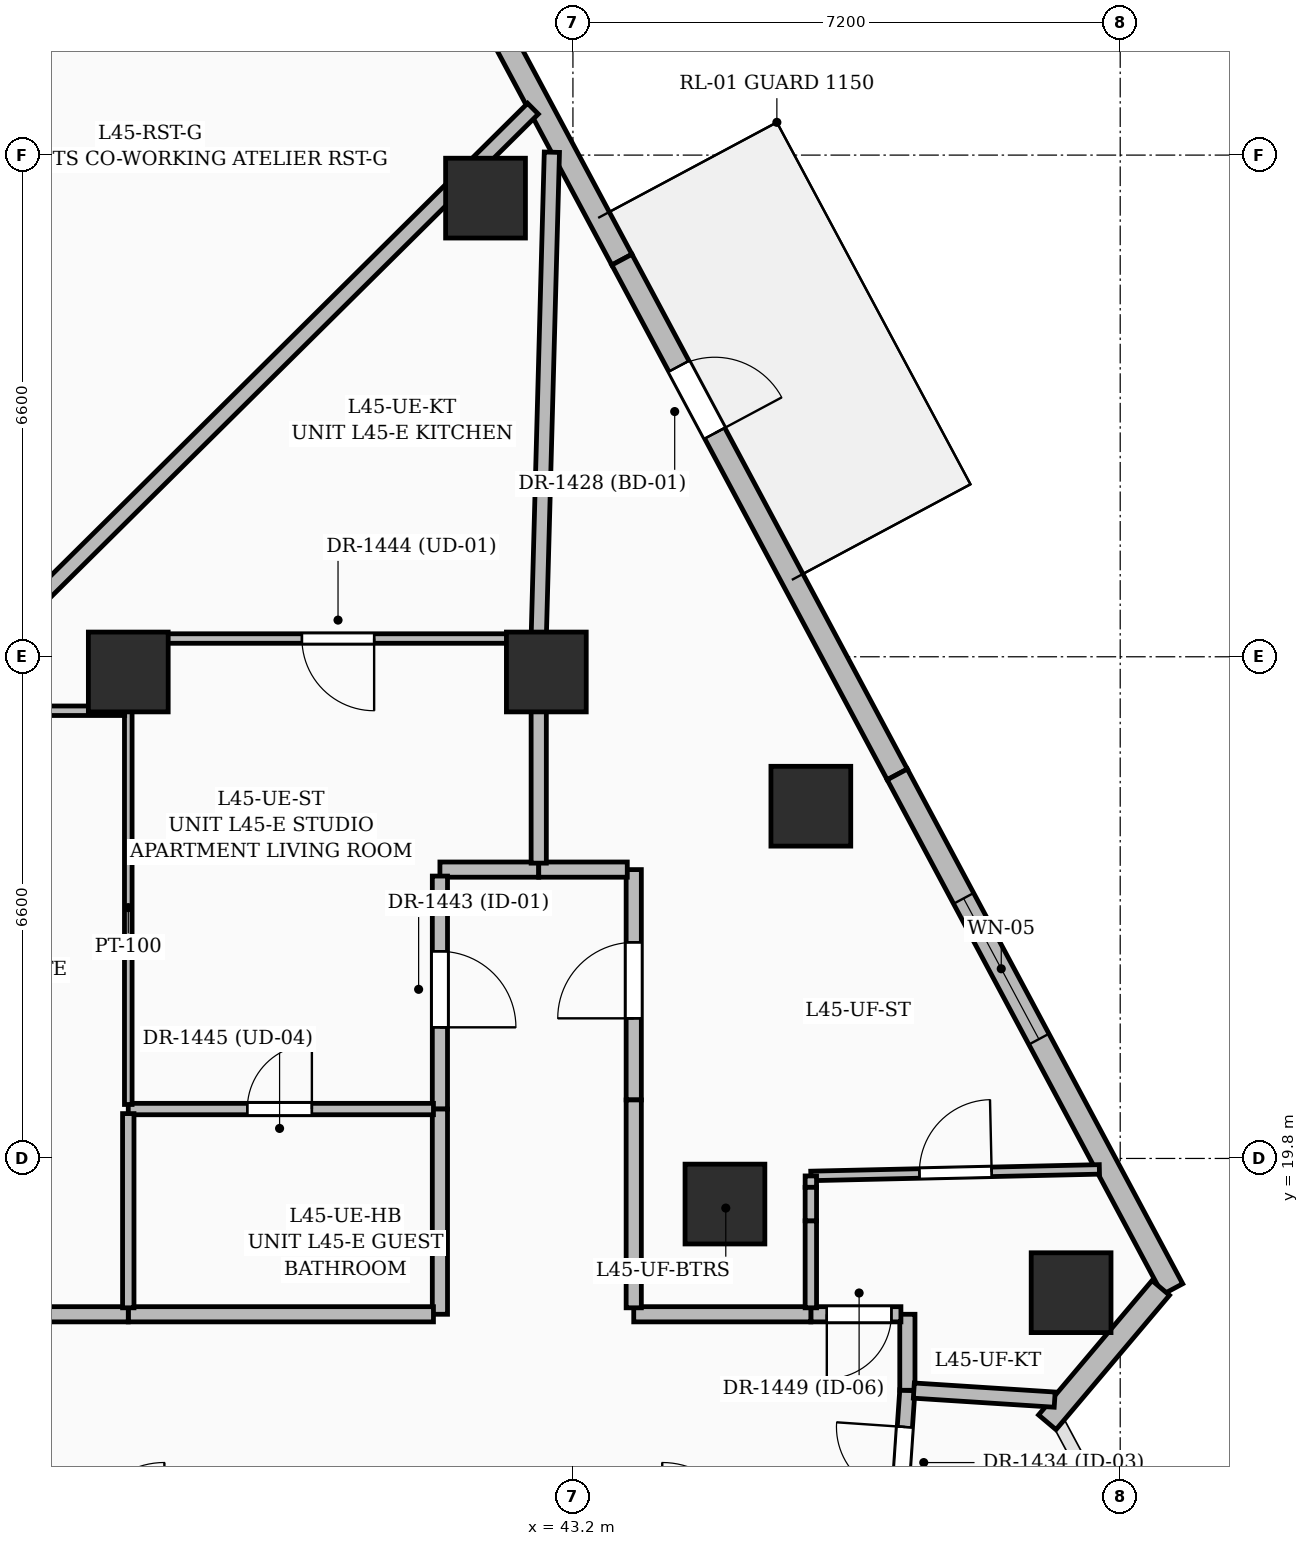
"""IFC4 building model, lengths in metres.
Left out: names, types, materials, properties, quantities, classifications, styles, units other than length and angle.
Written with IfcOpenShell. Run it as: python <this file> out.ifc"""

import sys

from ifc_helpers import new_model, si_unit, direction, frame, frame_2d, origin, origin_2d, place, context, subcontext, project, spatial, rectangle, extrude, element, fill, save


model = new_model("IFC4")
c1 = context("Model", 3, precision=1e-05, world=origin(), true_north=direction((0.0, 1.0)))
c2 = subcontext(c1, "Body", "Model", "MODEL_VIEW")
j1 = project(units=[si_unit("LENGTHUNIT", "METRE"), si_unit("PLANEANGLEUNIT", "RADIAN")], contexts=[c1])
p1 = place(None, origin())
s1 = spatial("IfcSite", under=j1, at=p1, CompositionType="ELEMENT")
p2 = place(p1, origin())
s2 = spatial("IfcBuilding", under=s1, at=p2, CompositionType="ELEMENT")
p3 = place(p2, frame((0.0, 0.0, 175.2)))
s3 = spatial("IfcBuildingStorey", under=s2, at=p3, CompositionType="ELEMENT", Elevation=175.2)
for number, where, z_axis, x_axis in (
    (1, (45.2, 19.2, 0.0), (0.0, 0.0, 1.0), (1.0, 0.0, 0.0)),
    (2, (42.85, 26.2, 0.0), (0.0, 0.0, 1.0), (1.0, 0.0, 0.0)),
    (3, (37.35, 26.2, 0.0), (0.0, 0.0, 1.0), (1.0, 0.0, 0.0)),
    (4, (49.754, 18.034, 0.0), (0.0, 0.0, 1.0), (1.0, 0.0, 0.0)),
    (5, (46.33, 24.434, 0.0), (0.0, 0.0, 1.0), (1.0, 0.0, 0.0)),
    (6, (42.05, 32.434, 0.0), (0.0, 0.0, 1.0), (1.0, 0.0, 0.0)),
):
    element("IfcColumn", number, at=place(p3, frame(where, z_axis=z_axis, x_axis=x_axis)), inside=s3, PredefinedType="COLUMN", context=c2, shape_type="SweptSolid", body=[
        extrude(rectangle(XDim=1.05, YDim=1.05, at=origin_2d()), origin(), (0.0, 0.0, 1.0), 3.6),
    ])
p4 = place(p3, frame((33.098, 33.58, 0.0), z_axis=(0.0, 0.0, 1.0), x_axis=(0.542037422538, 0.840354349408, 0.0)))
e7 = element("IfcWall", 7, at=p4, inside=s3, PredefinedType="SOLIDWALL", context=c2, shape_type="SweptSolid", body=[
    extrude(rectangle(XDim=5.782, YDim=0.3, at=frame_2d((2.891, 0.0))), origin(), (0.0, 0.0, 1.0), 3.35),
])
p5 = place(p4, frame((1.2, 0.0, 0.6)))
e8 = element("IfcOpeningElement", 8, at=p5, cuts=e7, PredefinedType="OPENING", context=c2, shape_type="SweptSolid", body=[
    extrude(rectangle(XDim=2.4, YDim=2.1, at=frame_2d((1.2, 1.05))), frame((0.0, 0.16, 0.0), z_axis=(0.0, -1.0, 0.0), x_axis=(1.0, 0.0, 0.0)), (0.0, 0.0, 1.0), 0.32),
])
p6 = place(p3, frame((40.495, 37.885, 0.0), z_axis=(0.0, 0.0, 1.0), x_axis=(0.471731834897, -0.88174206883, 0.0)))
e9 = element("IfcWall", 9, at=p6, inside=s3, PredefinedType="SOLIDWALL", context=c2, shape_type="SweptSolid", body=[
    extrude(rectangle(XDim=7.1, YDim=0.3, at=frame_2d((3.55, 0.0))), origin(), (0.0, 0.0, 1.0), 3.35),
])
p7 = place(p6, frame((2.22, 0.0, 0.8)))
e10 = element("IfcOpeningElement", 10, at=p7, cuts=e9, PredefinedType="OPENING", context=c2, shape_type="SweptSolid", body=[
    extrude(rectangle(XDim=1.2, YDim=1.8, at=frame_2d((0.6, 0.9))), frame((0.0, 0.16, 0.0), z_axis=(0.0, -1.0, 0.0), x_axis=(1.0, 0.0, 0.0)), (0.0, 0.0, 1.0), 0.32),
])
p8 = place(p3, frame((43.844, 31.625, 0.0), z_axis=(0.0, 0.0, 1.0), x_axis=(0.471736169991, -0.881739749542, 0.0)))
e11 = element("IfcWall", 11, at=p8, inside=s3, PredefinedType="SOLIDWALL", context=c2, shape_type="SweptSolid", body=[
    extrude(rectangle(XDim=7.68, YDim=0.3, at=frame_2d((3.84, 0.0))), origin(), (0.0, 0.0, 1.0), 3.35),
])
p9 = place(p8, frame((1.59, 0.0, 0.0)))
e12 = element("IfcOpeningElement", 12, at=p9, cuts=e11, PredefinedType="OPENING", context=c2, shape_type="SweptSolid", body=[
    extrude(rectangle(XDim=1.0, YDim=2.2, at=frame_2d((0.5, 1.1))), frame((0.0, 0.16, 0.0), z_axis=(0.0, -1.0, 0.0), x_axis=(1.0, 0.0, 0.0)), (0.0, 0.0, 1.0), 0.32),
])
p10 = place(p3, frame((47.467, 24.853, 0.0), z_axis=(0.0, 0.0, 1.0), x_axis=(0.471736169991, -0.881739749542, 0.0)))
e13 = element("IfcWall", 13, at=p10, inside=s3, PredefinedType="SOLIDWALL", context=c2, shape_type="SweptSolid", body=[
    extrude(rectangle(XDim=7.68, YDim=0.3, at=frame_2d((3.84, 0.0))), origin(), (0.0, 0.0, 1.0), 3.35),
])
p11 = place(p10, frame((1.85, 0.0, 0.55)))
e14 = element("IfcOpeningElement", 14, at=p11, cuts=e13, PredefinedType="OPENING", context=c2, shape_type="SweptSolid", body=[
    extrude(rectangle(XDim=2.1, YDim=2.4, at=frame_2d((1.05, 1.2))), frame((0.0, 0.16, 0.0), z_axis=(0.0, -1.0, 0.0), x_axis=(1.0, 0.0, 0.0)), (0.0, 0.0, 1.0), 0.32),
])
p12 = place(p3, frame((50.934, 18.097, 0.0), z_axis=(0.0, 0.0, 1.0), x_axis=(-0.645152076947, -0.764054184996, 0.0)))
e15 = element("IfcWall", 15, at=p12, inside=s3, PredefinedType="SOLIDWALL", context=c2, shape_type="SweptSolid", body=[
    extrude(rectangle(XDim=2.314, YDim=0.3, at=frame_2d((1.157, 0.0))), origin(), (0.0, 0.0, 1.0), 2.575),
])
p13 = place(p3, frame((47.425, 14.2, 0.0), z_axis=(0.0, 0.0, 1.0), x_axis=(0.068484119878, 0.997652206595, 0.0)))
e16 = element("IfcWall", 16, at=p13, inside=s3, PredefinedType="PARTITIONING", context=c2, shape_type="SweptSolid", body=[
    extrude(rectangle(XDim=2.556, YDim=0.2, at=frame_2d((1.278, 0.0))), origin(), (0.0, 0.0, 1.0), 2.464),
])
p14 = place(p13, frame((1.172, 0.0, 0.0)))
e17 = element("IfcOpeningElement", 17, at=p14, cuts=e16, PredefinedType="OPENING", context=c2, shape_type="SweptSolid", body=[
    extrude(rectangle(XDim=0.9, YDim=2.1, at=frame_2d((0.45, 1.05))), frame((0.0, 0.11, 0.0), z_axis=(0.0, -1.0, 0.0), x_axis=(1.0, 0.0, 0.0)), (0.0, 0.0, 1.0), 0.22),
])
p15 = place(p3, frame((42.75, 23.6, 0.0), z_axis=(0.0, 0.0, 1.0), x_axis=(-1.0, 0.0, 0.0)))
e18 = element("IfcWall", 18, at=p15, inside=s3, PredefinedType="PARTITIONING", context=c2, shape_type="SweptSolid", body=[
    extrude(rectangle(XDim=1.3, YDim=0.2, at=frame_2d((0.65, 0.0))), origin(), (0.0, 0.0, 1.0), 3.35),
])
p16 = place(p3, frame((41.45, 23.515, 0.0), z_axis=(0.0, 0.0, 1.0), x_axis=(0.0, -1.0, 0.0)))
e19 = element("IfcWall", 19, at=p16, inside=s3, PredefinedType="PARTITIONING", context=c2, shape_type="SweptSolid", body=[
    extrude(rectangle(XDim=3.065, YDim=0.2, at=frame_2d((1.532, 0.0))), origin(), (0.0, 0.0, 1.0), 3.35),
])
p17 = place(p16, frame((0.99, 0.0, 0.0)))
e20 = element("IfcOpeningElement", 20, at=p17, cuts=e19, PredefinedType="OPENING", context=c2, shape_type="SweptSolid", body=[
    extrude(rectangle(XDim=1.0, YDim=2.2, at=frame_2d((0.5, 1.1))), frame((0.0, 0.11, 0.0), z_axis=(0.0, -1.0, 0.0), x_axis=(1.0, 0.0, 0.0)), (0.0, 0.0, 1.0), 0.22),
])
p18 = place(p3, frame((41.45, 20.45, 0.0), z_axis=(0.0, 0.0, 1.0), x_axis=(0.0, -1.0, 0.0)))
e21 = element("IfcWall", 21, at=p18, inside=s3, PredefinedType="PARTITIONING", context=c2, shape_type="SweptSolid", body=[
    extrude(rectangle(XDim=2.7, YDim=0.2, at=frame_2d((1.35, 0.0))), origin(), (0.0, 0.0, 1.0), 2.853),
])
p19 = place(p3, frame((41.365, 17.75, 0.0), z_axis=(0.0, 0.0, 1.0), x_axis=(-1.0, 0.0, 0.0)))
e22 = element("IfcWall", 22, at=p19, inside=s3, PredefinedType="PARTITIONING", context=c2, shape_type="SweptSolid", body=[
    extrude(rectangle(XDim=4.015, YDim=0.2, at=frame_2d((2.007, 0.0))), origin(), (0.0, 0.0, 1.0), 3.35),
])
p20 = place(p3, frame((37.35, 17.75, 0.0), z_axis=(0.0, 0.0, 1.0), x_axis=(-1.0, 0.0, 0.0)))
e23 = element("IfcWall", 23, at=p20, inside=s3, PredefinedType="PARTITIONING", context=c2, shape_type="SweptSolid", body=[
    extrude(rectangle(XDim=5.4, YDim=0.2, at=frame_2d((2.7, 0.0))), origin(), (0.0, 0.0, 1.0), 2.436),
])
p21 = place(p20, frame((2.141, 0.0, 0.0)))
e24 = element("IfcOpeningElement", 24, at=p21, cuts=e23, PredefinedType="OPENING", context=c2, shape_type="SweptSolid", body=[
    extrude(rectangle(XDim=1.0, YDim=2.2, at=frame_2d((0.5, 1.1))), frame((0.0, 0.11, 0.0), z_axis=(0.0, -1.0, 0.0), x_axis=(1.0, 0.0, 0.0)), (0.0, 0.0, 1.0), 0.22),
])
p22 = place(p3, frame((44.0, 20.57, 0.0), z_axis=(0.0, 0.0, 1.0), x_axis=(0.0, 1.0, 0.0)))
e25 = element("IfcWall", 25, at=p22, inside=s3, PredefinedType="PARTITIONING", context=c2, shape_type="SweptSolid", body=[
    extrude(rectangle(XDim=3.03, YDim=0.2, at=frame_2d((1.515, 0.0))), origin(), (0.0, 0.0, 1.0), 2.436),
])
p23 = place(p22, frame((1.073, 0.0, 0.0)))
e26 = element("IfcOpeningElement", 26, at=p23, cuts=e25, PredefinedType="OPENING", context=c2, shape_type="SweptSolid", body=[
    extrude(rectangle(XDim=1.0, YDim=2.2, at=frame_2d((0.5, 1.1))), frame((0.0, 0.11, 0.0), z_axis=(0.0, -1.0, 0.0), x_axis=(1.0, 0.0, 0.0)), (0.0, 0.0, 1.0), 0.22),
])
p24 = place(p3, frame((43.915, 23.6, 0.0), z_axis=(0.0, 0.0, 1.0), x_axis=(-1.0, 0.0, 0.0)))
e27 = element("IfcWall", 27, at=p24, inside=s3, PredefinedType="PARTITIONING", context=c2, shape_type="SweptSolid", body=[
    extrude(rectangle(XDim=1.165, YDim=0.2, at=frame_2d((0.583, 0.0))), origin(), (0.0, 0.0, 1.0), 2.436),
])
p25 = place(p3, frame((47.6, 16.75, 0.0), z_axis=(0.0, 0.0, 1.0), x_axis=(0.0, 1.0, 0.0)))
e28 = element("IfcWall", 28, at=p25, inside=s3, PredefinedType="PARTITIONING", context=c2, shape_type="SweptSolid", body=[
    extrude(rectangle(XDim=1.0, YDim=0.2, at=frame_2d((0.5, 0.0))), origin(), (0.0, 0.0, 1.0), 2.86),
])
p26 = place(p3, frame((47.515, 17.75, 0.0), z_axis=(0.0, 0.0, 1.0), x_axis=(-1.0, 0.0, 0.0)))
e29 = element("IfcWall", 29, at=p26, inside=s3, PredefinedType="PARTITIONING", context=c2, shape_type="SweptSolid", body=[
    extrude(rectangle(XDim=1.185, YDim=0.2, at=frame_2d((0.592, 0.0))), origin(), (0.0, 0.0, 1.0), 2.86),
])
p27 = place(p26, frame((0.125, 0.0, 0.0)))
e30 = element("IfcOpeningElement", 30, at=p27, cuts=e29, PredefinedType="OPENING", context=c2, shape_type="SweptSolid", body=[
    extrude(rectangle(XDim=0.85, YDim=2.1, at=frame_2d((0.425, 1.05))), frame((0.0, 0.11, 0.0), z_axis=(0.0, -1.0, 0.0), x_axis=(1.0, 0.0, 0.0)), (0.0, 0.0, 1.0), 0.22),
])
p28 = place(p3, frame((46.33, 17.75, 0.0), z_axis=(0.0, 0.0, 1.0), x_axis=(-1.0, 0.0, 0.0)))
e31 = element("IfcWall", 31, at=p28, inside=s3, PredefinedType="PARTITIONING", context=c2, shape_type="SweptSolid", body=[
    extrude(rectangle(XDim=2.33, YDim=0.2, at=frame_2d((1.165, 0.0))), origin(), (0.0, 0.0, 1.0), 2.436),
])
p29 = place(p3, frame((49.538, 16.627, 0.0), z_axis=(0.0, 0.0, 1.0), x_axis=(-0.997939995932, 0.064154224478, 0.0)))
e32 = element("IfcWall", 32, at=p29, inside=s3, PredefinedType="PARTITIONING", context=c2, shape_type="SweptSolid", body=[
    extrude(rectangle(XDim=1.857, YDim=0.2, at=frame_2d((0.929, 0.0))), origin(), (0.0, 0.0, 1.0), 2.464),
])
p30 = place(p3, frame((37.35, 20.45, 0.0), z_axis=(0.0, 0.0, 1.0), x_axis=(1.0, 0.0, 0.0)))
e33 = element("IfcWall", 33, at=p30, inside=s3, PredefinedType="PARTITIONING", context=c2, shape_type="SweptSolid", body=[
    extrude(rectangle(XDim=4.015, YDim=0.15, at=frame_2d((2.007, 0.0))), origin(), (0.0, 0.0, 1.0), 3.35),
])
p31 = place(p30, frame((1.566, 0.0, 0.0)))
e34 = element("IfcOpeningElement", 34, at=p31, cuts=e33, PredefinedType="OPENING", context=c2, shape_type="SweptSolid", body=[
    extrude(rectangle(XDim=0.85, YDim=2.1, at=frame_2d((0.425, 1.05))), frame((0.0, 0.085, 0.0), z_axis=(0.0, -1.0, 0.0), x_axis=(1.0, 0.0, 0.0)), (0.0, 0.0, 1.0), 0.17),
])
p32 = place(p3, frame((42.75, 26.64, 0.0), z_axis=(0.0, 0.0, 1.0), x_axis=(-1.0, 0.0, 0.0)))
e35 = element("IfcWall", 35, at=p32, inside=s3, PredefinedType="PARTITIONING", context=c2, shape_type="SweptSolid", body=[
    extrude(rectangle(XDim=5.4, YDim=0.125, at=frame_2d((2.7, 0.0))), origin(), (0.0, 0.0, 1.0), 3.35),
])
p33 = place(p32, frame((2.165, 0.0, 0.0)))
e36 = element("IfcOpeningElement", 36, at=p33, cuts=e35, PredefinedType="OPENING", context=c2, shape_type="SweptSolid", body=[
    extrude(rectangle(XDim=0.95, YDim=2.2, at=frame_2d((0.475, 1.1))), frame((0.0, 0.072, 0.0), z_axis=(0.0, -1.0, 0.0), x_axis=(1.0, 0.0, 0.0)), (0.0, 0.0, 1.0), 0.145),
])
p34 = place(p3, frame((37.35, 26.593, 0.0), z_axis=(0.0, 0.0, 1.0), x_axis=(0.0, -1.0, 0.0)))
e37 = element("IfcWall", 37, at=p34, inside=s3, PredefinedType="PARTITIONING", context=c2, shape_type="SweptSolid", body=[
    extrude(rectangle(XDim=0.903, YDim=0.125, at=frame_2d((0.451, 0.0))), origin(), (0.0, 0.0, 1.0), 3.35),
])
p35 = place(p3, frame((37.35, 25.69, 0.0), z_axis=(0.0, 0.0, 1.0), x_axis=(0.0, -1.0, 0.0)))
e38 = element("IfcWall", 38, at=p35, inside=s3, PredefinedType="PARTITIONING", context=c2, shape_type="SweptSolid", body=[
    extrude(rectangle(XDim=5.18, YDim=0.1, at=frame_2d((2.59, 0.0))), origin(), (0.0, 0.0, 1.0), 3.35),
])
p36 = place(p3, frame((42.75, 23.685, 0.0), z_axis=(0.0, 0.0, 1.0), x_axis=(0.0, 1.0, 0.0)))
e39 = element("IfcWall", 39, at=p36, inside=s3, PredefinedType="PARTITIONING", context=c2, shape_type="SweptSolid", body=[
    extrude(rectangle(XDim=2.907, YDim=0.2, at=frame_2d((1.454, 0.0))), origin(), (0.0, 0.0, 1.0), 3.35),
])
p37 = place(p3, frame((37.35, 20.39, 0.0), z_axis=(0.0, 0.0, 1.0), x_axis=(0.0, -1.0, 0.0)))
e40 = element("IfcWall", 40, at=p37, inside=s3, PredefinedType="PARTITIONING", context=c2, shape_type="SweptSolid", body=[
    extrude(rectangle(XDim=2.555, YDim=0.15, at=frame_2d((1.277, 0.0))), origin(), (0.0, 0.0, 1.0), 2.853),
])
p38 = place(p3, frame((34.81, 25.69, 0.0), z_axis=(0.0, 0.0, 1.0), x_axis=(1.0, 0.0, 0.0)))
e41 = element("IfcWall", 41, at=p38, inside=s3, PredefinedType="PARTITIONING", context=c2, shape_type="SweptSolid", body=[
    extrude(rectangle(XDim=2.492, YDim=0.125, at=frame_2d((1.246, 0.0))), origin(), (0.0, 0.0, 1.0), 2.436),
])
p39 = place(p3, frame((42.751, 26.688, 0.0), z_axis=(0.0, 0.0, 1.0), x_axis=(0.027092926653, 0.999632919289, 0.0)))
e42 = element("IfcWall", 42, at=p39, inside=s3, PredefinedType="PARTITIONING", context=c2, shape_type="SweptSolid", body=[
    extrude(rectangle(XDim=6.353, YDim=0.2, at=frame_2d((3.177, 0.0))), origin(), (0.0, 0.0, 1.0), 2.464),
])
p40 = place(p3, frame((42.674, 33.611, 0.0), z_axis=(0.0, 0.0, 1.0), x_axis=(-0.710345403642, -0.703853257096, 0.0)))
e43 = element("IfcWall", 43, at=p40, inside=s3, PredefinedType="PARTITIONING", context=c2, shape_type="SweptSolid", body=[
    extrude(rectangle(XDim=11.207, YDim=0.2, at=frame_2d((5.603, 0.0))), origin(), (0.0, 0.0, 1.0), 2.464),
])
p41 = place(p3, frame((46.33, 19.57, 0.0), z_axis=(0.0, 0.0, 1.0), x_axis=(0.999743823458, 0.022633768064, 0.0)))
e44 = element("IfcWall", 44, at=p41, inside=s3, PredefinedType="PARTITIONING", context=c2, shape_type="SweptSolid", body=[
    extrude(rectangle(XDim=3.797, YDim=0.125, at=frame_2d((1.898, 0.0))), origin(), (0.0, 0.0, 1.0), 2.57),
])
p42 = place(p41, frame((1.429, 0.0, 0.0)))
e45 = element("IfcOpeningElement", 45, at=p42, cuts=e44, PredefinedType="OPENING", context=c2, shape_type="SweptSolid", body=[
    extrude(rectangle(XDim=0.95, YDim=2.2, at=frame_2d((0.475, 1.1))), frame((0.0, 0.072, 0.0), z_axis=(0.0, -1.0, 0.0), x_axis=(1.0, 0.0, 0.0)), (0.0, 0.0, 1.0), 0.145),
])
p43 = place(p3, frame((46.33, 18.98, 0.0), z_axis=(0.0, 0.0, 1.0), x_axis=(0.0, -1.0, 0.0)))
e46 = element("IfcWall", 46, at=p43, inside=s3, PredefinedType="PARTITIONING", context=c2, shape_type="SweptSolid", body=[
    extrude(rectangle(XDim=1.145, YDim=0.15, at=frame_2d((0.573, 0.0))), origin(), (0.0, 0.0, 1.0), 2.86),
])
p44 = place(p3, frame((46.33, 19.57, 0.0), z_axis=(0.0, 0.0, 1.0), x_axis=(0.0, -1.0, 0.0)))
e47 = element("IfcWall", 47, at=p44, inside=s3, PredefinedType="PARTITIONING", context=c2, shape_type="SweptSolid", body=[
    extrude(rectangle(XDim=0.15, YDim=0.15, at=frame_2d((0.075, 0.0))), origin(), (0.0, 0.0, 1.0), 3.35),
])
p45 = place(p3, frame((44.0, 17.835, 0.0), z_axis=(0.0, 0.0, 1.0), x_axis=(0.0, 1.0, 0.0)))
e48 = element("IfcWall", 48, at=p45, inside=s3, PredefinedType="PARTITIONING", context=c2, shape_type="SweptSolid", body=[
    extrude(rectangle(XDim=2.735, YDim=0.2, at=frame_2d((1.368, 0.0))), origin(), (0.0, 0.0, 1.0), 2.853),
])
p46 = place(p3, frame((46.33, 19.42, 0.0), z_axis=(0.0, 0.0, 1.0), x_axis=(0.0, -1.0, 0.0)))
e49 = element("IfcWall", 49, at=p46, inside=s3, PredefinedType="PARTITIONING", context=c2, shape_type="SweptSolid", body=[
    extrude(rectangle(XDim=0.44, YDim=0.15, at=frame_2d((0.22, 0.0))), origin(), (0.0, 0.0, 1.0), 2.86),
])
p47 = place(p9, origin())
e50 = element("IfcDoor", 50, at=p47, inside=s3, OperationType="SINGLE_SWING_RIGHT", PredefinedType="DOOR", context=c2, shape_type="SweptSolid", body=[
    extrude(rectangle(XDim=1.0, YDim=2.2, at=frame_2d((0.5, 1.1))), frame((0.0, 0.025, 0.0), z_axis=(0.0, -1.0, 0.0), x_axis=(1.0, 0.0, 0.0)), (0.0, 0.0, 1.0), 0.05),
])
fill(e12, e50)
p48 = place(p11, origin())
e51 = element("IfcWindow", 51, at=p48, inside=s3, PartitioningType="SINGLE_PANEL", PredefinedType="WINDOW", context=c2, shape_type="SweptSolid", body=[
    extrude(rectangle(XDim=2.1, YDim=2.4, at=frame_2d((1.05, 1.2))), frame((0.0, 0.03, 0.0), z_axis=(0.0, -1.0, 0.0), x_axis=(1.0, 0.0, 0.0)), (0.0, 0.0, 1.0), 0.06),
])
fill(e14, e51)
p49 = place(p14, origin())
e52 = element("IfcDoor", 52, at=p49, inside=s3, OperationType="SINGLE_SWING_RIGHT", PredefinedType="DOOR", context=c2, shape_type="SweptSolid", body=[
    extrude(rectangle(XDim=0.9, YDim=2.1, at=frame_2d((0.45, 1.05))), frame((0.0, 0.025, 0.0), z_axis=(0.0, -1.0, 0.0), x_axis=(1.0, 0.0, 0.0)), (0.0, 0.0, 1.0), 0.05),
])
fill(e17, e52)
p50 = place(p17, origin())
e53 = element("IfcDoor", 53, at=p50, inside=s3, OperationType="SINGLE_SWING_RIGHT", PredefinedType="DOOR", context=c2, shape_type="SweptSolid", body=[
    extrude(rectangle(XDim=1.0, YDim=2.2, at=frame_2d((0.5, 1.1))), frame((0.0, 0.025, 0.0), z_axis=(0.0, -1.0, 0.0), x_axis=(1.0, 0.0, 0.0)), (0.0, 0.0, 1.0), 0.05),
])
fill(e20, e53)
p51 = place(p33, origin())
e54 = element("IfcDoor", 54, at=p51, inside=s3, OperationType="SINGLE_SWING_LEFT", PredefinedType="DOOR", context=c2, shape_type="SweptSolid", body=[
    extrude(rectangle(XDim=0.95, YDim=2.2, at=frame_2d((0.475, 1.1))), frame((0.0, 0.025, 0.0), z_axis=(0.0, -1.0, 0.0), x_axis=(1.0, 0.0, 0.0)), (0.0, 0.0, 1.0), 0.05),
])
fill(e36, e54)
p52 = place(p31, origin())
e55 = element("IfcDoor", 55, at=p52, inside=s3, OperationType="SINGLE_SWING_RIGHT", PredefinedType="DOOR", context=c2, shape_type="SweptSolid", body=[
    extrude(rectangle(XDim=0.85, YDim=2.1, at=frame_2d((0.425, 1.05))), frame((0.0, 0.025, 0.0), z_axis=(0.0, -1.0, 0.0), x_axis=(1.0, 0.0, 0.0)), (0.0, 0.0, 1.0), 0.05),
])
fill(e34, e55)
p53 = place(p23, origin())
e56 = element("IfcDoor", 56, at=p53, inside=s3, OperationType="SINGLE_SWING_LEFT", PredefinedType="DOOR", context=c2, shape_type="SweptSolid", body=[
    extrude(rectangle(XDim=1.0, YDim=2.2, at=frame_2d((0.5, 1.1))), frame((0.0, 0.025, 0.0), z_axis=(0.0, -1.0, 0.0), x_axis=(1.0, 0.0, 0.0)), (0.0, 0.0, 1.0), 0.05),
])
fill(e26, e56)
p54 = place(p42, origin())
e57 = element("IfcDoor", 57, at=p54, inside=s3, OperationType="SINGLE_SWING_RIGHT", PredefinedType="DOOR", context=c2, shape_type="SweptSolid", body=[
    extrude(rectangle(XDim=0.95, YDim=2.2, at=frame_2d((0.475, 1.1))), frame((0.0, 0.025, 0.0), z_axis=(0.0, -1.0, 0.0), x_axis=(1.0, 0.0, 0.0)), (0.0, 0.0, 1.0), 0.05),
])
fill(e45, e57)
p55 = place(p27, origin())
e58 = element("IfcDoor", 58, at=p55, inside=s3, OperationType="SINGLE_SWING_RIGHT", PredefinedType="DOOR", context=c2, shape_type="SweptSolid", body=[
    extrude(rectangle(XDim=0.85, YDim=2.1, at=frame_2d((0.425, 1.05))), frame((0.0, 0.025, 0.0), z_axis=(0.0, -1.0, 0.0), x_axis=(1.0, 0.0, 0.0)), (0.0, 0.0, 1.0), 0.05),
])
fill(e30, e58)
save(model, sys.argv[1])
